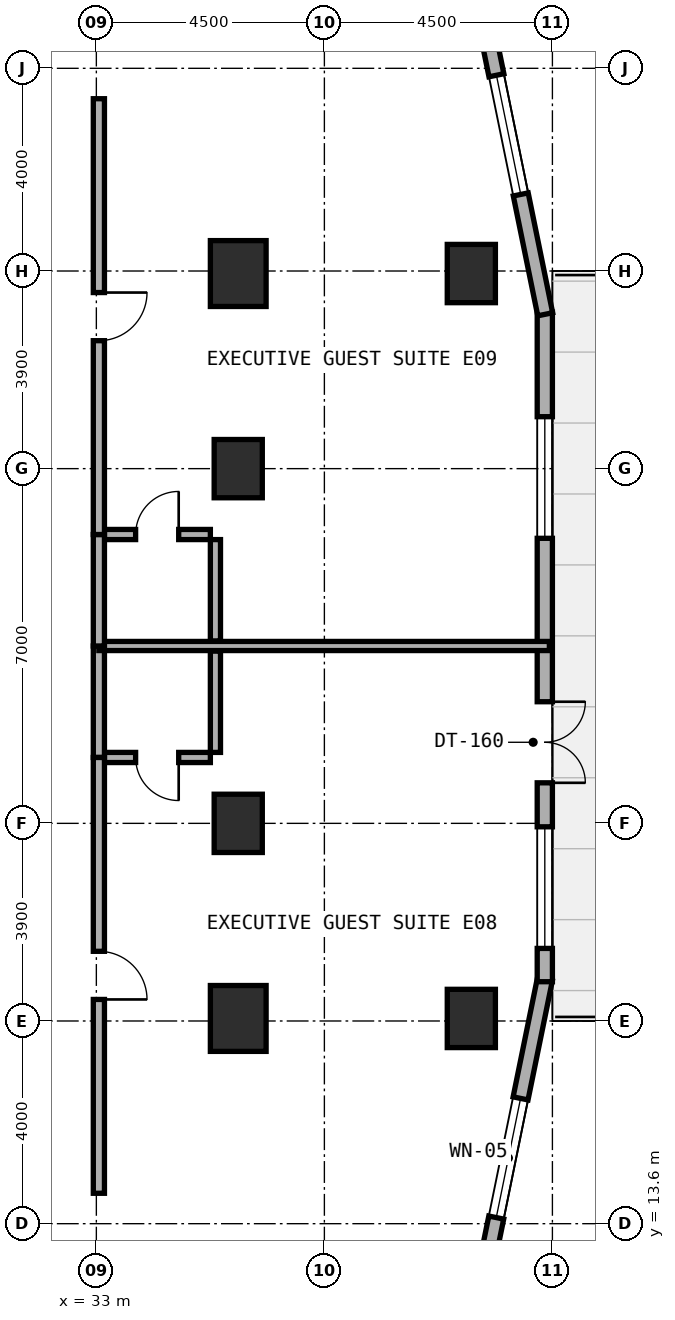
"""IFC4 building model, lengths in metres.
Left out: names, types, materials, properties, quantities, classifications, styles, units other than length and angle.
Written with IfcOpenShell. Run it as: python <this file> out.ifc"""

import sys

from ifc_helpers import new_model, si_unit, direction, frame, frame_2d, origin, origin_2d, place, context, subcontext, project, spatial, rectangle, extrude, element, fill, save


model = new_model("IFC4")
c1 = context("Model", 3, precision=1e-05, world=origin(), true_north=direction((0.0, 1.0)))
c2 = subcontext(c1, "Body", "Model", "MODEL_VIEW")
j1 = project(units=[si_unit("LENGTHUNIT", "METRE"), si_unit("PLANEANGLEUNIT", "RADIAN")], contexts=[c1])
p1 = place(None, origin())
s1 = spatial("IfcSite", under=j1, at=p1, CompositionType="ELEMENT")
p2 = place(p1, origin())
s2 = spatial("IfcBuilding", under=s1, at=p2, CompositionType="ELEMENT")
p3 = place(p2, frame((0.0, 0.0, 24.0)))
s3 = spatial("IfcBuildingStorey", under=s2, at=p3, CompositionType="ELEMENT", Elevation=24.0)
for number, where, z_axis, x_axis in (
    (1, (35.8, 21.5, 0.0), (0.0, 0.0, 1.0), (1.0, 0.0, 0.0)),
    (2, (35.8, 28.5, 0.0), (0.0, 0.0, 1.0), (1.0, 0.0, 0.0)),
):
    element("IfcColumn", number, at=place(p3, frame(where, z_axis=z_axis, x_axis=x_axis)), inside=s3, PredefinedType="COLUMN", context=c2, shape_type="SweptSolid", body=[
        extrude(rectangle(XDim=0.95, YDim=1.15, at=origin_2d()), origin(), (0.0, 0.0, 1.0), 3.5),
    ])
for number, where, z_axis, x_axis in (
    (3, (35.8, 17.65, 0.0), (0.0, 0.0, 1.0), (1.0, 0.0, 0.0)),
    (4, (35.8, 32.35, 0.0), (0.0, 0.0, 1.0), (1.0, 0.0, 0.0)),
):
    element("IfcColumn", number, at=place(p3, frame(where, z_axis=z_axis, x_axis=x_axis)), inside=s3, PredefinedType="COLUMN", context=c2, shape_type="SweptSolid", body=[
        extrude(rectangle(XDim=1.1, YDim=1.3, at=origin_2d()), origin(), (0.0, 0.0, 1.0), 3.5),
    ])
for number, where, z_axis, x_axis in (
    (5, (40.4, 17.65, 0.0), (0.0, 0.0, 1.0), (1.0, 0.0, 0.0)),
    (6, (40.4, 32.35, 0.0), (0.0, 0.0, 1.0), (1.0, 0.0, 0.0)),
):
    element("IfcColumn", number, at=place(p3, frame(where, z_axis=z_axis, x_axis=x_axis)), inside=s3, PredefinedType="COLUMN", context=c2, shape_type="SweptSolid", body=[
        extrude(rectangle(XDim=0.95, YDim=1.15, at=origin_2d()), origin(), (0.0, 0.0, 1.0), 3.5),
    ])
p4 = place(p3, frame((39.851, 8.622, 0.0), z_axis=(0.0, 0.0, 1.0), x_axis=(0.200002104792, 0.979795467472, 0.0)))
e7 = element("IfcWall", 7, at=p4, inside=s3, PredefinedType="STANDARD", context=c2, shape_type="SweptSolid", body=[
    extrude(rectangle(XDim=10.0, YDim=0.3, at=frame_2d((5.0, 0.0))), origin(), (0.0, 0.0, 1.0), 3.22),
])
p5 = place(p4, frame((0.378, 0.0, 0.85)))
e8 = element("IfcOpeningElement", 8, at=p5, cuts=e7, PredefinedType="OPENING", context=c2, shape_type="SweptSolid", body=[
    extrude(rectangle(XDim=1.8, YDim=1.5, at=frame_2d((0.9, 0.75))), frame((0.0, 0.16, 0.0), z_axis=(0.0, -1.0, 0.0), x_axis=(1.0, 0.0, 0.0)), (0.0, 0.0, 1.0), 0.32),
])
p6 = place(p4, frame((5.204, 0.0, 0.8)))
e9 = element("IfcOpeningElement", 9, at=p6, cuts=e7, PredefinedType="OPENING", context=c2, shape_type="SweptSolid", body=[
    extrude(rectangle(XDim=2.4, YDim=1.6, at=frame_2d((1.2, 0.8))), frame((0.0, 0.16, 0.0), z_axis=(0.0, -1.0, 0.0), x_axis=(1.0, 0.0, 0.0)), (0.0, 0.0, 1.0), 0.32),
])
p7 = place(p3, frame((41.85, 18.375, 0.0), z_axis=(0.0, 0.0, 1.0), x_axis=(0.0, 1.0, 0.0)))
e10 = element("IfcWall", 10, at=p7, inside=s3, PredefinedType="STANDARD", context=c2, shape_type="SweptSolid", body=[
    extrude(rectangle(XDim=13.215, YDim=0.3, at=frame_2d((6.607, 0.0))), origin(), (0.0, 0.0, 1.0), 3.22),
])
p8 = place(p7, frame((3.925, 0.0, 0.0)))
e11 = element("IfcOpeningElement", 11, at=p8, cuts=e10, PredefinedType="OPENING", context=c2, shape_type="SweptSolid", body=[
    extrude(rectangle(XDim=1.6, YDim=2.2, at=frame_2d((0.8, 1.1))), frame((0.0, 0.16, 0.0), z_axis=(0.0, -1.0, 0.0), x_axis=(1.0, 0.0, 0.0)), (0.0, 0.0, 1.0), 0.32),
])
p9 = place(p7, frame((0.657, 0.0, 0.8)))
e12 = element("IfcOpeningElement", 12, at=p9, cuts=e10, PredefinedType="OPENING", context=c2, shape_type="SweptSolid", body=[
    extrude(rectangle(XDim=2.4, YDim=1.6, at=frame_2d((1.2, 0.8))), frame((0.0, 0.16, 0.0), z_axis=(0.0, -1.0, 0.0), x_axis=(1.0, 0.0, 0.0)), (0.0, 0.0, 1.0), 0.32),
])
p10 = place(p7, frame((8.75, 0.0, 0.8)))
e13 = element("IfcOpeningElement", 13, at=p10, cuts=e10, PredefinedType="OPENING", context=c2, shape_type="SweptSolid", body=[
    extrude(rectangle(XDim=2.4, YDim=1.6, at=frame_2d((1.2, 0.8))), frame((0.0, 0.16, 0.0), z_axis=(0.0, -1.0, 0.0), x_axis=(1.0, 0.0, 0.0)), (0.0, 0.0, 1.0), 0.32),
])
p11 = place(p3, frame((41.858, 31.546, 0.0), z_axis=(0.0, 0.0, 1.0), x_axis=(-0.19998861198, 0.979798221614, 0.0)))
e14 = element("IfcWall", 14, at=p11, inside=s3, PredefinedType="STANDARD", context=c2, shape_type="SweptSolid", body=[
    extrude(rectangle(XDim=10.035, YDim=0.3, at=frame_2d((5.017, 0.0))), origin(), (0.0, 0.0, 1.0), 3.22),
])
p12 = place(p11, frame((2.414, 0.0, 0.8)))
e15 = element("IfcOpeningElement", 15, at=p12, cuts=e14, PredefinedType="OPENING", context=c2, shape_type="SweptSolid", body=[
    extrude(rectangle(XDim=2.4, YDim=1.6, at=frame_2d((1.2, 0.8))), frame((0.0, 0.16, 0.0), z_axis=(0.0, -1.0, 0.0), x_axis=(1.0, 0.0, 0.0)), (0.0, 0.0, 1.0), 0.32),
])
p13 = place(p11, frame((7.856, 0.0, 0.85)))
e16 = element("IfcOpeningElement", 16, at=p13, cuts=e14, PredefinedType="OPENING", context=c2, shape_type="SweptSolid", body=[
    extrude(rectangle(XDim=1.8, YDim=1.5, at=frame_2d((0.9, 0.75))), frame((0.0, 0.16, 0.0), z_axis=(0.0, -1.0, 0.0), x_axis=(1.0, 0.0, 0.0)), (0.0, 0.0, 1.0), 0.32),
])
p14 = place(p3, frame((33.15, 22.8, 0.0), z_axis=(0.0, 0.0, 1.0), x_axis=(1.0, 0.0, 0.0)))
e17 = element("IfcWall", 17, at=p14, inside=s3, PredefinedType="PLUMBINGWALL", context=c2, shape_type="SweptSolid", body=[
    extrude(rectangle(XDim=2.1, YDim=0.2, at=frame_2d((1.05, 0.0))), origin(), (0.0, 0.0, 1.0), 3.22),
])
p15 = place(p14, frame((0.625, 0.0, 0.0)))
e18 = element("IfcOpeningElement", 18, at=p15, cuts=e17, PredefinedType="OPENING", context=c2, shape_type="SweptSolid", body=[
    extrude(rectangle(XDim=0.85, YDim=2.1, at=frame_2d((0.425, 1.05))), frame((0.0, 0.11, 0.0), z_axis=(0.0, -1.0, 0.0), x_axis=(1.0, 0.0, 0.0)), (0.0, 0.0, 1.0), 0.22),
])
p16 = place(p3, frame((35.35, 22.9, 0.0), z_axis=(0.0, 0.0, 1.0), x_axis=(0.0, 1.0, 0.0)))
e19 = element("IfcWall", 19, at=p16, inside=s3, PredefinedType="PLUMBINGWALL", context=c2, shape_type="SweptSolid", body=[
    extrude(rectangle(XDim=2.0, YDim=0.2, at=frame_2d((1.0, 0.0))), origin(), (0.0, 0.0, 1.0), 3.22),
])
p17 = place(p3, frame((33.05, 22.8, 0.0), z_axis=(0.0, 0.0, 1.0), x_axis=(0.0, 1.0, 0.0)))
e20 = element("IfcWall", 20, at=p17, inside=s3, PredefinedType="SOLIDWALL", context=c2, shape_type="SweptSolid", body=[
    extrude(rectangle(XDim=2.2, YDim=0.22, at=frame_2d((1.1, 0.0))), origin(), (0.0, 0.0, 1.0), 3.22),
])
p18 = place(p3, frame((33.05, 14.2, 0.0), z_axis=(0.0, 0.0, 1.0), x_axis=(0.0, 1.0, 0.0)))
e21 = element("IfcWall", 21, at=p18, inside=s3, PredefinedType="SOLIDWALL", context=c2, shape_type="SweptSolid", body=[
    extrude(rectangle(XDim=8.6, YDim=0.22, at=frame_2d((4.3, 0.0))), origin(), (0.0, 0.0, 1.0), 2.295),
])
p19 = place(p18, frame((3.825, 0.0, 0.0)))
e22 = element("IfcOpeningElement", 22, at=p19, cuts=e21, PredefinedType="OPENING", context=c2, shape_type="SweptSolid", body=[
    extrude(rectangle(XDim=0.95, YDim=2.1, at=frame_2d((0.475, 1.05))), frame((0.0, 0.12, 0.0), z_axis=(0.0, -1.0, 0.0), x_axis=(1.0, 0.0, 0.0)), (0.0, 0.0, 1.0), 0.24),
])
p20 = place(p3, frame((33.05, 25.0, 0.0), z_axis=(0.0, 0.0, 1.0), x_axis=(1.0, 0.0, 0.0)))
e23 = element("IfcWall", 23, at=p20, inside=s3, PredefinedType="SOLIDWALL", context=c2, shape_type="SweptSolid", body=[
    extrude(rectangle(XDim=8.89, YDim=0.18, at=frame_2d((4.445, 0.0))), origin(), (0.0, 0.0, 1.0), 2.745),
])
p21 = place(p3, frame((33.15, 27.2, 0.0), z_axis=(0.0, 0.0, 1.0), x_axis=(1.0, 0.0, 0.0)))
e24 = element("IfcWall", 24, at=p21, inside=s3, PredefinedType="PLUMBINGWALL", context=c2, shape_type="SweptSolid", body=[
    extrude(rectangle(XDim=2.1, YDim=0.2, at=frame_2d((1.05, 0.0))), origin(), (0.0, 0.0, 1.0), 3.22),
])
p22 = place(p21, frame((0.625, 0.0, 0.0)))
e25 = element("IfcOpeningElement", 25, at=p22, cuts=e24, PredefinedType="OPENING", context=c2, shape_type="SweptSolid", body=[
    extrude(rectangle(XDim=0.85, YDim=2.1, at=frame_2d((0.425, 1.05))), frame((0.0, 0.11, 0.0), z_axis=(0.0, -1.0, 0.0), x_axis=(1.0, 0.0, 0.0)), (0.0, 0.0, 1.0), 0.22),
])
p23 = place(p3, frame((35.35, 25.1, 0.0), z_axis=(0.0, 0.0, 1.0), x_axis=(0.0, 1.0, 0.0)))
e26 = element("IfcWall", 26, at=p23, inside=s3, PredefinedType="PLUMBINGWALL", context=c2, shape_type="SweptSolid", body=[
    extrude(rectangle(XDim=2.0, YDim=0.2, at=frame_2d((1.0, 0.0))), origin(), (0.0, 0.0, 1.0), 3.22),
])
p24 = place(p3, frame((33.05, 25.0, 0.0), z_axis=(0.0, 0.0, 1.0), x_axis=(0.0, 1.0, 0.0)))
e27 = element("IfcWall", 27, at=p24, inside=s3, PredefinedType="SOLIDWALL", context=c2, shape_type="SweptSolid", body=[
    extrude(rectangle(XDim=2.2, YDim=0.22, at=frame_2d((1.1, 0.0))), origin(), (0.0, 0.0, 1.0), 3.22),
])
p25 = place(p3, frame((33.05, 27.2, 0.0), z_axis=(0.0, 0.0, 1.0), x_axis=(0.0, 1.0, 0.0)))
e28 = element("IfcWall", 28, at=p25, inside=s3, PredefinedType="SOLIDWALL", context=c2, shape_type="SweptSolid", body=[
    extrude(rectangle(XDim=8.6, YDim=0.22, at=frame_2d((4.3, 0.0))), origin(), (0.0, 0.0, 1.0), 2.295),
])
p26 = place(p25, frame((3.825, 0.0, 0.0)))
e29 = element("IfcOpeningElement", 29, at=p26, cuts=e28, PredefinedType="OPENING", context=c2, shape_type="SweptSolid", body=[
    extrude(rectangle(XDim=0.95, YDim=2.1, at=frame_2d((0.475, 1.05))), frame((0.0, 0.12, 0.0), z_axis=(0.0, -1.0, 0.0), x_axis=(1.0, 0.0, 0.0)), (0.0, 0.0, 1.0), 0.24),
])
p27 = place(p6, origin())
e30 = element("IfcWindow", 30, at=p27, inside=s3, PartitioningType="SINGLE_PANEL", PredefinedType="WINDOW", context=c2, shape_type="SweptSolid", body=[
    extrude(rectangle(XDim=2.4, YDim=1.6, at=frame_2d((1.2, 0.8))), frame((0.0, 0.03, 0.0), z_axis=(0.0, -1.0, 0.0), x_axis=(1.0, 0.0, 0.0)), (0.0, 0.0, 1.0), 0.06),
])
fill(e9, e30)
p28 = place(p8, frame((1.6, 0.0, 0.0), z_axis=(0.0, 0.0, 1.0), x_axis=(-1.0, 0.0, 0.0)))
e31 = element("IfcDoor", 31, at=p28, inside=s3, OperationType="DOUBLE_DOOR_SINGLE_SWING", PredefinedType="DOOR", context=c2, shape_type="SweptSolid", body=[
    extrude(rectangle(XDim=1.6, YDim=2.2, at=frame_2d((0.8, 1.1))), frame((0.0, 0.025, 0.0), z_axis=(0.0, -1.0, 0.0), x_axis=(1.0, 0.0, 0.0)), (0.0, 0.0, 1.0), 0.05),
])
fill(e11, e31)
p29 = place(p9, origin())
e32 = element("IfcWindow", 32, at=p29, inside=s3, PartitioningType="SINGLE_PANEL", PredefinedType="WINDOW", context=c2, shape_type="SweptSolid", body=[
    extrude(rectangle(XDim=2.4, YDim=1.6, at=frame_2d((1.2, 0.8))), frame((0.0, 0.03, 0.0), z_axis=(0.0, -1.0, 0.0), x_axis=(1.0, 0.0, 0.0)), (0.0, 0.0, 1.0), 0.06),
])
fill(e12, e32)
p30 = place(p10, origin())
e33 = element("IfcWindow", 33, at=p30, inside=s3, PartitioningType="SINGLE_PANEL", PredefinedType="WINDOW", context=c2, shape_type="SweptSolid", body=[
    extrude(rectangle(XDim=2.4, YDim=1.6, at=frame_2d((1.2, 0.8))), frame((0.0, 0.03, 0.0), z_axis=(0.0, -1.0, 0.0), x_axis=(1.0, 0.0, 0.0)), (0.0, 0.0, 1.0), 0.06),
])
fill(e13, e33)
p31 = place(p12, origin())
e34 = element("IfcWindow", 34, at=p31, inside=s3, PartitioningType="SINGLE_PANEL", PredefinedType="WINDOW", context=c2, shape_type="SweptSolid", body=[
    extrude(rectangle(XDim=2.4, YDim=1.6, at=frame_2d((1.2, 0.8))), frame((0.0, 0.03, 0.0), z_axis=(0.0, -1.0, 0.0), x_axis=(1.0, 0.0, 0.0)), (0.0, 0.0, 1.0), 0.06),
])
fill(e15, e34)
p32 = place(p15, frame((0.85, 0.0, 0.0), z_axis=(0.0, 0.0, 1.0), x_axis=(-1.0, 0.0, 0.0)))
e35 = element("IfcDoor", 35, at=p32, inside=s3, OperationType="SINGLE_SWING_LEFT", PredefinedType="DOOR", context=c2, shape_type="SweptSolid", body=[
    extrude(rectangle(XDim=0.85, YDim=2.1, at=frame_2d((0.425, 1.05))), frame((0.0, 0.025, 0.0), z_axis=(0.0, -1.0, 0.0), x_axis=(1.0, 0.0, 0.0)), (0.0, 0.0, 1.0), 0.05),
])
fill(e18, e35)
p33 = place(p19, frame((0.95, 0.0, 0.0), z_axis=(0.0, 0.0, 1.0), x_axis=(-1.0, 0.0, 0.0)))
e36 = element("IfcDoor", 36, at=p33, inside=s3, OperationType="SINGLE_SWING_RIGHT", PredefinedType="DOOR", context=c2, shape_type="SweptSolid", body=[
    extrude(rectangle(XDim=0.95, YDim=2.1, at=frame_2d((0.475, 1.05))), frame((0.0, 0.025, 0.0), z_axis=(0.0, -1.0, 0.0), x_axis=(1.0, 0.0, 0.0)), (0.0, 0.0, 1.0), 0.05),
])
fill(e22, e36)
p34 = place(p22, origin())
e37 = element("IfcDoor", 37, at=p34, inside=s3, OperationType="SINGLE_SWING_RIGHT", PredefinedType="DOOR", context=c2, shape_type="SweptSolid", body=[
    extrude(rectangle(XDim=0.85, YDim=2.1, at=frame_2d((0.425, 1.05))), frame((0.0, 0.025, 0.0), z_axis=(0.0, -1.0, 0.0), x_axis=(1.0, 0.0, 0.0)), (0.0, 0.0, 1.0), 0.05),
])
fill(e25, e37)
p35 = place(p26, frame((0.95, 0.0, 0.0), z_axis=(0.0, 0.0, 1.0), x_axis=(-1.0, 0.0, 0.0)))
e38 = element("IfcDoor", 38, at=p35, inside=s3, OperationType="SINGLE_SWING_LEFT", PredefinedType="DOOR", context=c2, shape_type="SweptSolid", body=[
    extrude(rectangle(XDim=0.95, YDim=2.1, at=frame_2d((0.475, 1.05))), frame((0.0, 0.025, 0.0), z_axis=(0.0, -1.0, 0.0), x_axis=(1.0, 0.0, 0.0)), (0.0, 0.0, 1.0), 0.05),
])
fill(e29, e38)
save(model, sys.argv[1])
